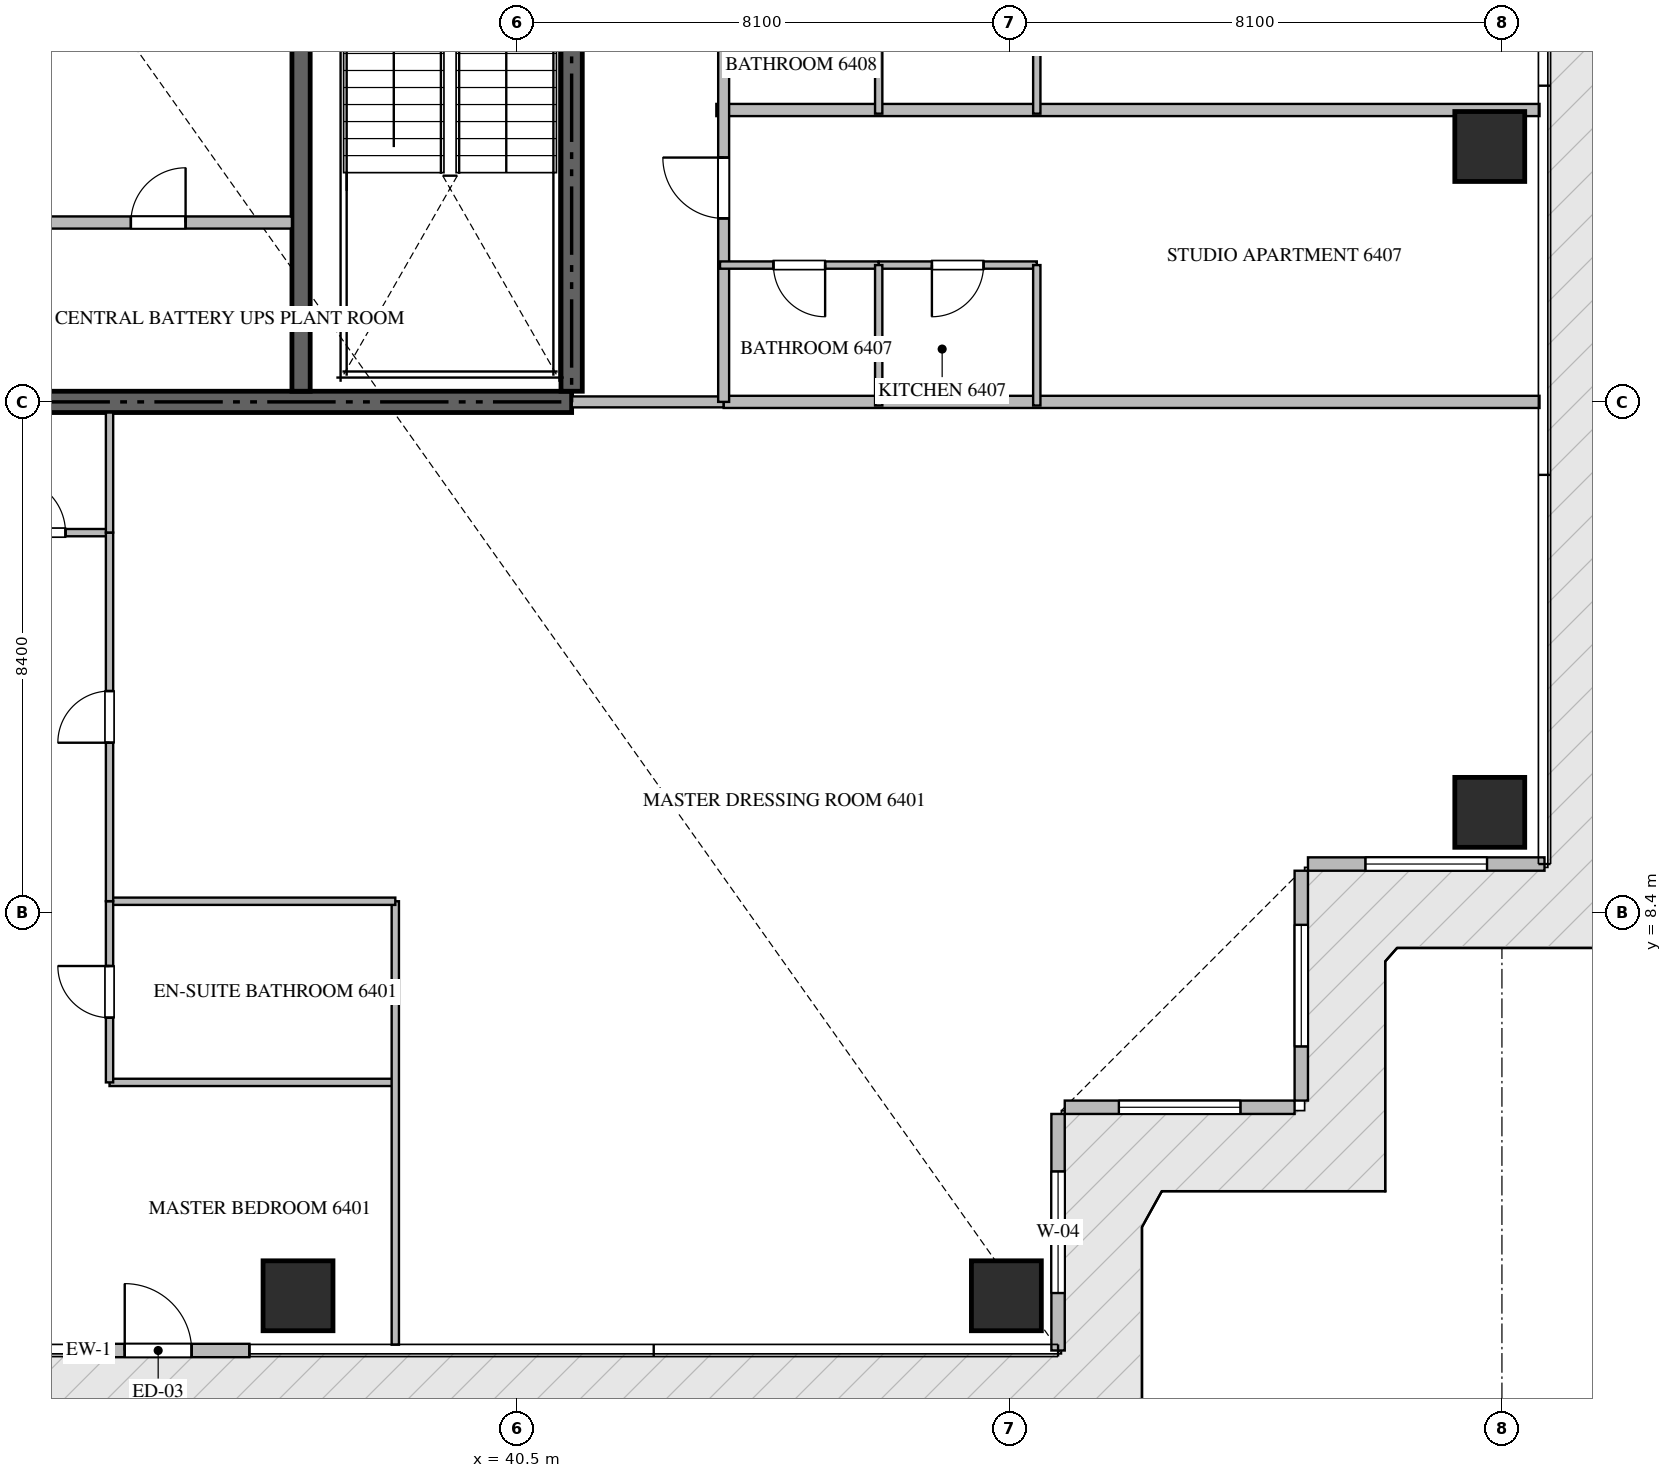
"""IFC4 building model, lengths in metres.
Left out: names, types, materials, properties, quantities, classifications, styles, units other than length and angle.
Written with IfcOpenShell. Run it as: python <this file> out.ifc"""

import sys

from ifc_helpers import new_model, si_unit, direction, frame, frame_2d, origin, origin_2d, place, context, subcontext, project, spatial, rectangle, extrude, source, transform, mapped, element, fill, save


model = new_model("IFC4")
c1 = context("Model", 3, precision=1e-05, world=origin(), true_north=direction((0.0, 1.0)))
c2 = subcontext(c1, "Body", "Model", "MODEL_VIEW")
j1 = project(units=[si_unit("LENGTHUNIT", "METRE"), si_unit("PLANEANGLEUNIT", "RADIAN")], contexts=[c1])
p1 = place(None, origin())
s1 = spatial("IfcSite", under=j1, at=p1, CompositionType="ELEMENT")
p2 = place(p1, origin())
s2 = spatial("IfcBuilding", under=s1, at=p2, CompositionType="ELEMENT")
p3 = place(p2, frame((0.0, 0.0, 256.65)))
s3 = spatial("IfcBuildingStorey", under=s2, at=p3, CompositionType="ELEMENT", Elevation=256.65)
p4 = place(p3, frame((23.4, 16.8, -0.26), z_axis=(0.0, 0.0, 1.0), x_axis=(1.0, 0.0, 0.0)))
e1 = element("IfcWall", 1, at=p4, inside=s3, PredefinedType="SHEAR", context=c2, shape_type="SweptSolid", body=[
    extrude(rectangle(XDim=18.0, YDim=0.35, at=frame_2d((9.0, 0.0))), origin(), (0.0, 0.0, 1.0), 3.848),
])
p5 = place(p3, frame((41.4, 16.975, -0.26), z_axis=(0.0, 0.0, 1.0), x_axis=(0.0, 1.0, 0.0)))
e2 = element("IfcWall", 2, at=p5, inside=s3, PredefinedType="SHEAR", context=c2, shape_type="SweptSolid", body=[
    extrude(rectangle(XDim=8.375, YDim=0.35, at=frame_2d((4.188, 0.0))), origin(), (0.0, 0.0, 1.0), 3.848),
])
p6 = place(p3, frame((36.95, 16.975, -0.26), z_axis=(0.0, 0.0, 1.0), x_axis=(0.0, 1.0, 0.0)))
e3 = element("IfcWall", 3, at=p6, inside=s3, PredefinedType="SHEAR", context=c2, shape_type="SweptSolid", body=[
    extrude(rectangle(XDim=8.375, YDim=0.3, at=frame_2d((4.188, 0.0))), origin(), (0.0, 0.0, 1.0), 3.848),
])
m1 = source(origin(), c2, "Body", "SweptSolid", [
    extrude(rectangle(XDim=1.15, YDim=1.15, at=origin_2d()), origin(), (0.0, 0.0, 1.0), 3.85),
])
for number, where, z_axis, x_axis in (
    (4, (36.9, 2.1, -0.26), (0.0, 0.0, 1.0), (1.0, 0.0, 0.0)),
    (5, (48.55, 2.1, -0.26), (0.0, 0.0, 1.0), (1.0, 0.0, 0.0)),
    (6, (56.5, 10.05, -0.26), (0.0, 0.0, 1.0), (1.0, 0.0, 0.0)),
    (7, (56.5, 21.0, -0.26), (0.0, 0.0, 1.0), (1.0, 0.0, 0.0)),
):
    element("IfcColumn", number, at=place(p3, frame(where, z_axis=z_axis, x_axis=x_axis)), inside=s3, PredefinedType="COLUMN", context=c2, shape_type="MappedRepresentation", body=[
        mapped(m1, transform((0.0, 0.0, 0.0), scale=1.0)),
    ])
p7 = place(p3, frame((33.1, 1.2, 0.0), z_axis=(0.0, 0.0, 1.0), x_axis=(1.0, 0.0, 0.0)))
e8 = element("IfcWall", 8, at=p7, inside=s3, PredefinedType="ELEMENTEDWALL", context=c2, shape_type="SweptSolid", body=[
    extrude(rectangle(XDim=3.0, YDim=0.22, at=frame_2d((1.5, 0.0))), origin(), (0.0, 0.0, 1.0), 3.575),
])
p8 = place(p7, frame((0.95, 0.0, 0.0)))
e9 = element("IfcOpeningElement", 9, at=p8, cuts=e8, PredefinedType="OPENING", context=c2, shape_type="SweptSolid", body=[
    extrude(rectangle(XDim=1.1, YDim=2.2, at=frame_2d((0.55, 1.1))), frame((0.0, 0.12, 0.0), z_axis=(0.0, -1.0, 0.0), x_axis=(1.0, 0.0, 0.0)), (0.0, 0.0, 1.0), 0.24),
])
p9 = place(p3, frame((49.4, 1.2, 0.0), z_axis=(0.0, 0.0, 1.0), x_axis=(0.0, 1.0, 0.0)))
e10 = element("IfcWall", 10, at=p9, inside=s3, PredefinedType="ELEMENTEDWALL", context=c2, shape_type="SweptSolid", body=[
    extrude(rectangle(XDim=3.89, YDim=0.22, at=frame_2d((1.945, 0.0))), origin(), (0.0, 0.0, 1.0), 3.575),
])
p10 = place(p9, frame((0.945, 0.0, 0.65)))
e11 = element("IfcOpeningElement", 11, at=p10, cuts=e10, PredefinedType="OPENING", context=c2, shape_type="SweptSolid", body=[
    extrude(rectangle(XDim=2.0, YDim=2.2, at=frame_2d((1.0, 1.1))), frame((0.0, 0.12, 0.0), z_axis=(0.0, -1.0, 0.0), x_axis=(1.0, 0.0, 0.0)), (0.0, 0.0, 1.0), 0.24),
])
p11 = place(p3, frame((49.51, 5.2, 0.0), z_axis=(0.0, 0.0, 1.0), x_axis=(1.0, 0.0, 0.0)))
e12 = element("IfcWall", 12, at=p11, inside=s3, PredefinedType="ELEMENTEDWALL", context=c2, shape_type="SweptSolid", body=[
    extrude(rectangle(XDim=3.78, YDim=0.22, at=frame_2d((1.89, 0.0))), origin(), (0.0, 0.0, 1.0), 3.575),
])
p12 = place(p11, frame((0.89, 0.0, 0.65)))
e13 = element("IfcOpeningElement", 13, at=p12, cuts=e12, PredefinedType="OPENING", context=c2, shape_type="SweptSolid", body=[
    extrude(rectangle(XDim=2.0, YDim=2.2, at=frame_2d((1.0, 1.1))), frame((0.0, 0.12, 0.0), z_axis=(0.0, -1.0, 0.0), x_axis=(1.0, 0.0, 0.0)), (0.0, 0.0, 1.0), 0.24),
])
p13 = place(p3, frame((53.4, 5.31, 0.0), z_axis=(0.0, 0.0, 1.0), x_axis=(0.0, 1.0, 0.0)))
e14 = element("IfcWall", 14, at=p13, inside=s3, PredefinedType="ELEMENTEDWALL", context=c2, shape_type="SweptSolid", body=[
    extrude(rectangle(XDim=3.78, YDim=0.22, at=frame_2d((1.89, 0.0))), origin(), (0.0, 0.0, 1.0), 3.575),
])
p14 = place(p13, frame((0.89, 0.0, 0.65)))
e15 = element("IfcOpeningElement", 15, at=p14, cuts=e14, PredefinedType="OPENING", context=c2, shape_type="SweptSolid", body=[
    extrude(rectangle(XDim=2.0, YDim=2.2, at=frame_2d((1.0, 1.1))), frame((0.0, 0.12, 0.0), z_axis=(0.0, -1.0, 0.0), x_axis=(1.0, 0.0, 0.0)), (0.0, 0.0, 1.0), 0.24),
])
p15 = place(p3, frame((53.51, 9.2, 0.0), z_axis=(0.0, 0.0, 1.0), x_axis=(1.0, 0.0, 0.0)))
e16 = element("IfcWall", 16, at=p15, inside=s3, PredefinedType="ELEMENTEDWALL", context=c2, shape_type="SweptSolid", body=[
    extrude(rectangle(XDim=3.89, YDim=0.22, at=frame_2d((1.945, 0.0))), origin(), (0.0, 0.0, 1.0), 3.575),
])
p16 = place(p15, frame((0.945, 0.0, 0.65)))
e17 = element("IfcOpeningElement", 17, at=p16, cuts=e16, PredefinedType="OPENING", context=c2, shape_type="SweptSolid", body=[
    extrude(rectangle(XDim=2.0, YDim=2.2, at=frame_2d((1.0, 1.1))), frame((0.0, 0.12, 0.0), z_axis=(0.0, -1.0, 0.0), x_axis=(1.0, 0.0, 0.0)), (0.0, 0.0, 1.0), 0.24),
])
p17 = place(p3, frame((32.402, 19.75, 0.0), z_axis=(0.0, 0.0, 1.0), x_axis=(1.0, 0.0, 0.0)))
e18 = element("IfcWall", 18, at=p17, inside=s3, PredefinedType="STANDARD", context=c2, shape_type="SweptSolid", body=[
    extrude(rectangle(XDim=4.398, YDim=0.2, at=frame_2d((2.199, 0.0))), origin(), (0.0, 0.0, 1.0), 3.59),
])
p18 = place(p17, frame((1.749, 0.0, 0.0)))
e19 = element("IfcOpeningElement", 19, at=p18, cuts=e18, PredefinedType="OPENING", context=c2, shape_type="SweptSolid", body=[
    extrude(rectangle(XDim=0.9, YDim=2.1, at=frame_2d((0.45, 1.05))), frame((0.0, 0.11, 0.0), z_axis=(0.0, -1.0, 0.0), x_axis=(1.0, 0.0, 0.0)), (0.0, 0.0, 1.0), 0.22),
])
p19 = place(p3, frame((43.78, 21.6, 0.0), z_axis=(0.0, 0.0, 1.0), x_axis=(1.0, 0.0, 0.0)))
e20 = element("IfcWall", 20, at=p19, inside=s3, PredefinedType="PARTITIONING", context=c2, shape_type="SweptSolid", body=[
    extrude(rectangle(XDim=13.538, YDim=0.2, at=frame_2d((6.769, 0.0))), origin(), (0.0, 0.0, 1.0), 3.59),
])
p20 = place(p3, frame((43.9, 16.8, 0.0), z_axis=(0.0, 0.0, 1.0), x_axis=(1.0, 0.0, 0.0)))
e21 = element("IfcWall", 21, at=p20, inside=s3, PredefinedType="PARTITIONING", context=c2, shape_type="SweptSolid", body=[
    extrude(rectangle(XDim=13.418, YDim=0.2, at=frame_2d((6.709, 0.0))), origin(), (0.0, 0.0, 1.0), 3.59),
])
p21 = place(p3, frame((41.402, 16.8, 0.0), z_axis=(0.0, 0.0, 1.0), x_axis=(1.0, 0.0, 0.0)))
e22 = element("IfcWall", 22, at=p21, inside=s3, PredefinedType="PARTITIONING", context=c2, shape_type="SweptSolid", body=[
    extrude(rectangle(XDim=2.496, YDim=0.18, at=frame_2d((1.248, 0.0))), origin(), (0.0, 0.0, 1.0), 3.59),
])
p22 = place(p3, frame((43.9, 16.8, 0.0), z_axis=(0.0, 0.0, 1.0), x_axis=(0.0, 1.0, 0.0)))
e23 = element("IfcWall", 23, at=p22, inside=s3, PredefinedType="PARTITIONING", context=c2, shape_type="SweptSolid", body=[
    extrude(rectangle(XDim=16.8, YDim=0.18, at=frame_2d((8.4, 0.0))), origin(), (0.0, 0.0, 1.0), 3.59),
])
p23 = place(p22, frame((3.018, 0.0, 0.0)))
e24 = element("IfcOpeningElement", 24, at=p23, cuts=e23, PredefinedType="OPENING", context=c2, shape_type="SweptSolid", body=[
    extrude(rectangle(XDim=1.0, YDim=2.15, at=frame_2d((0.5, 1.075))), frame((0.0, 0.1, 0.0), z_axis=(0.0, -1.0, 0.0), x_axis=(1.0, 0.0, 0.0)), (0.0, 0.0, 1.0), 0.2),
])
p24 = place(p22, frame((9.18, 0.0, 0.0)))
e25 = element("IfcOpeningElement", 25, at=p24, cuts=e23, PredefinedType="OPENING", context=c2, shape_type="SweptSolid", body=[
    extrude(rectangle(XDim=1.0, YDim=2.15, at=frame_2d((0.5, 1.075))), frame((0.0, 0.1, 0.0), z_axis=(0.0, -1.0, 0.0), x_axis=(1.0, 0.0, 0.0)), (0.0, 0.0, 1.0), 0.2),
])
p25 = place(p22, frame((14.5, 0.0, 0.0)))
e26 = element("IfcOpeningElement", 26, at=p25, cuts=e23, PredefinedType="OPENING", context=c2, shape_type="SweptSolid", body=[
    extrude(rectangle(XDim=1.0, YDim=2.15, at=frame_2d((0.5, 1.075))), frame((0.0, 0.1, 0.0), z_axis=(0.0, -1.0, 0.0), x_axis=(1.0, 0.0, 0.0)), (0.0, 0.0, 1.0), 0.2),
])
p26 = place(p3, frame((31.452, 14.65, 0.0), z_axis=(0.0, 0.0, 1.0), x_axis=(1.0, 0.0, 0.0)))
e27 = element("IfcWall", 27, at=p26, inside=s3, PredefinedType="PARTITIONING", context=c2, shape_type="SweptSolid", body=[
    extrude(rectangle(XDim=2.348, YDim=0.12, at=frame_2d((1.174, 0.0))), origin(), (0.0, 0.0, 1.0), 3.59),
])
p27 = place(p26, frame((0.724, 0.0, 0.0)))
e28 = element("IfcOpeningElement", 28, at=p27, cuts=e27, PredefinedType="OPENING", context=c2, shape_type="SweptSolid", body=[
    extrude(rectangle(XDim=0.9, YDim=2.1, at=frame_2d((0.45, 1.05))), frame((0.0, 0.07, 0.0), z_axis=(0.0, -1.0, 0.0), x_axis=(1.0, 0.0, 0.0)), (0.0, 0.0, 1.0), 0.14),
])
p28 = place(p3, frame((33.8, 5.609, 0.0), z_axis=(0.0, 0.0, 1.0), x_axis=(1.0, 0.0, 0.0)))
e29 = element("IfcWall", 29, at=p28, inside=s3, PredefinedType="PARTITIONING", context=c2, shape_type="SweptSolid", body=[
    extrude(rectangle(XDim=4.7, YDim=0.12, at=frame_2d((2.35, 0.0))), origin(), (0.0, 0.0, 1.0), 3.59),
])
p29 = place(p3, frame((38.5, 1.295, 0.0), z_axis=(0.0, 0.0, 1.0), x_axis=(0.0, 1.0, 0.0)))
e30 = element("IfcWall", 30, at=p29, inside=s3, PredefinedType="PARTITIONING", context=c2, shape_type="SweptSolid", body=[
    extrude(rectangle(XDim=7.293, YDim=0.12, at=frame_2d((3.646, 0.0))), origin(), (0.0, 0.0, 1.0), 3.59),
])
p30 = place(p3, frame((33.8, 8.588, 0.0), z_axis=(0.0, 0.0, 1.0), x_axis=(1.0, 0.0, 0.0)))
e31 = element("IfcWall", 31, at=p30, inside=s3, PredefinedType="PARTITIONING", context=c2, shape_type="SweptSolid", body=[
    extrude(rectangle(XDim=4.7, YDim=0.12, at=frame_2d((2.35, 0.0))), origin(), (0.0, 0.0, 1.0), 3.59),
])
p31 = place(p3, frame((33.8, 5.609, 0.0), z_axis=(0.0, 0.0, 1.0), x_axis=(0.0, 1.0, 0.0)))
e32 = element("IfcWall", 32, at=p31, inside=s3, PredefinedType="PARTITIONING", context=c2, shape_type="SweptSolid", body=[
    extrude(rectangle(XDim=2.979, YDim=0.12, at=frame_2d((1.49, 0.0))), origin(), (0.0, 0.0, 1.0), 3.59),
])
p32 = place(p31, frame((1.064, 0.0, 0.0)))
e33 = element("IfcOpeningElement", 33, at=p32, cuts=e32, PredefinedType="OPENING", context=c2, shape_type="SweptSolid", body=[
    extrude(rectangle(XDim=0.85, YDim=2.1, at=frame_2d((0.425, 1.05))), frame((0.0, 0.07, 0.0), z_axis=(0.0, -1.0, 0.0), x_axis=(1.0, 0.0, 0.0)), (0.0, 0.0, 1.0), 0.14),
])
p33 = place(p3, frame((33.8, 8.59, 0.0), z_axis=(0.0, 0.0, 1.0), x_axis=(0.0, 1.0, 0.0)))
e34 = element("IfcWall", 34, at=p33, inside=s3, PredefinedType="PARTITIONING", context=c2, shape_type="SweptSolid", body=[
    extrude(rectangle(XDim=6.06, YDim=0.12, at=frame_2d((3.03, 0.0))), origin(), (0.0, 0.0, 1.0), 3.59),
])
p34 = place(p33, frame((2.605, 0.0, 0.0)))
e35 = element("IfcOpeningElement", 35, at=p34, cuts=e34, PredefinedType="OPENING", context=c2, shape_type="SweptSolid", body=[
    extrude(rectangle(XDim=0.85, YDim=2.1, at=frame_2d((0.425, 1.05))), frame((0.0, 0.07, 0.0), z_axis=(0.0, -1.0, 0.0), x_axis=(1.0, 0.0, 0.0)), (0.0, 0.0, 1.0), 0.14),
])
p35 = place(p3, frame((33.8, 14.652, 0.0), z_axis=(0.0, 0.0, 1.0), x_axis=(0.0, 1.0, 0.0)))
e36 = element("IfcWall", 36, at=p35, inside=s3, PredefinedType="PARTITIONING", context=c2, shape_type="SweptSolid", body=[
    extrude(rectangle(XDim=1.973, YDim=0.12, at=frame_2d((0.986, 0.0))), origin(), (0.0, 0.0, 1.0), 3.59),
])
p36 = place(p3, frame((49.05, 19.05, 0.0), z_axis=(0.0, 0.0, 1.0), x_axis=(-1.0, 0.0, 0.0)))
e37 = element("IfcWall", 37, at=p36, inside=s3, PredefinedType="PARTITIONING", context=c2, shape_type="SweptSolid", body=[
    extrude(rectangle(XDim=2.6, YDim=0.12, at=frame_2d((1.3, 0.0))), origin(), (0.0, 0.0, 1.0), 3.59),
])
p37 = place(p36, frame((0.875, 0.0, 0.0)))
e38 = element("IfcOpeningElement", 38, at=p37, cuts=e37, PredefinedType="OPENING", context=c2, shape_type="SweptSolid", body=[
    extrude(rectangle(XDim=0.85, YDim=2.1, at=frame_2d((0.425, 1.05))), frame((0.0, 0.07, 0.0), z_axis=(0.0, -1.0, 0.0), x_axis=(1.0, 0.0, 0.0)), (0.0, 0.0, 1.0), 0.14),
])
p38 = place(p3, frame((46.448, 19.05, 0.0), z_axis=(0.0, 0.0, 1.0), x_axis=(-1.0, 0.0, 0.0)))
e39 = element("IfcWall", 39, at=p38, inside=s3, PredefinedType="PARTITIONING", context=c2, shape_type="SweptSolid", body=[
    extrude(rectangle(XDim=2.608, YDim=0.12, at=frame_2d((1.304, 0.0))), origin(), (0.0, 0.0, 1.0), 3.59),
])
p39 = place(p38, frame((0.879, 0.0, 0.0)))
e40 = element("IfcOpeningElement", 40, at=p39, cuts=e39, PredefinedType="OPENING", context=c2, shape_type="SweptSolid", body=[
    extrude(rectangle(XDim=0.85, YDim=2.1, at=frame_2d((0.425, 1.05))), frame((0.0, 0.07, 0.0), z_axis=(0.0, -1.0, 0.0), x_axis=(1.0, 0.0, 0.0)), (0.0, 0.0, 1.0), 0.14),
])
for number, where, z_axis, x_axis in (
    (41, (46.45, 16.74, 0.0), (0.0, 0.0, 1.0), (0.0, 1.0, 0.0)),
    (42, (49.05, 16.74, 0.0), (0.0, 0.0, 1.0), (0.0, 1.0, 0.0)),
):
    element("IfcWall", number, at=place(p3, frame(where, z_axis=z_axis, x_axis=x_axis)), inside=s3, PredefinedType="PARTITIONING", context=c2, shape_type="SweptSolid", body=[
        extrude(rectangle(XDim=2.31, YDim=0.12, at=frame_2d((1.155, 0.0))), origin(), (0.0, 0.0, 1.0), 3.59),
    ])
for number, where, z_axis, x_axis in (
    (43, (46.45, 21.54, 0.0), (0.0, 0.0, 1.0), (0.0, 1.0, 0.0)),
    (44, (49.05, 21.54, 0.0), (0.0, 0.0, 1.0), (0.0, 1.0, 0.0)),
):
    element("IfcWall", number, at=place(p3, frame(where, z_axis=z_axis, x_axis=x_axis)), inside=s3, PredefinedType="PARTITIONING", context=c2, shape_type="SweptSolid", body=[
        extrude(rectangle(XDim=2.81, YDim=0.12, at=frame_2d((1.405, 0.0))), origin(), (0.0, 0.0, 1.0), 3.59),
    ])
m2 = source(origin(), c2, "Body", "SweptSolid", [
    extrude(rectangle(XDim=1.1, YDim=2.2, at=frame_2d((0.55, 1.1))), frame((0.0, 0.025, 0.0), z_axis=(0.0, -1.0, 0.0), x_axis=(1.0, 0.0, 0.0)), (0.0, 0.0, 1.0), 0.05),
])
p40 = place(p8, origin())
e45 = element("IfcDoor", 45, at=p40, inside=s3, OperationType="SINGLE_SWING_LEFT", PredefinedType="DOOR", context=c2, shape_type="MappedRepresentation", body=[
    mapped(m2, transform((0.0, 0.0, 0.0), scale=1.0)),
])
fill(e9, e45)
m3 = source(origin(), c2, "Body", "SweptSolid", [
    extrude(rectangle(XDim=2.0, YDim=2.2, at=frame_2d((1.0, 1.1))), frame((0.0, 0.03, 0.0), z_axis=(0.0, -1.0, 0.0), x_axis=(1.0, 0.0, 0.0)), (0.0, 0.0, 1.0), 0.06),
])
p41 = place(p10, origin())
e46 = element("IfcWindow", 46, at=p41, inside=s3, PartitioningType="SINGLE_PANEL", PredefinedType="WINDOW", context=c2, shape_type="MappedRepresentation", body=[
    mapped(m3, transform((0.0, 0.0, 0.0), scale=1.0)),
])
fill(e11, e46)
p42 = place(p12, origin())
e47 = element("IfcWindow", 47, at=p42, inside=s3, PartitioningType="SINGLE_PANEL", PredefinedType="WINDOW", context=c2, shape_type="MappedRepresentation", body=[
    mapped(m3, transform((0.0, 0.0, 0.0), scale=1.0)),
])
fill(e13, e47)
p43 = place(p14, origin())
e48 = element("IfcWindow", 48, at=p43, inside=s3, PartitioningType="SINGLE_PANEL", PredefinedType="WINDOW", context=c2, shape_type="MappedRepresentation", body=[
    mapped(m3, transform((0.0, 0.0, 0.0), scale=1.0)),
])
fill(e15, e48)
p44 = place(p16, origin())
e49 = element("IfcWindow", 49, at=p44, inside=s3, PartitioningType="SINGLE_PANEL", PredefinedType="WINDOW", context=c2, shape_type="MappedRepresentation", body=[
    mapped(m3, transform((0.0, 0.0, 0.0), scale=1.0)),
])
fill(e17, e49)
m4 = source(origin(), c2, "Body", "SweptSolid", [
    extrude(rectangle(XDim=0.9, YDim=2.1, at=frame_2d((0.45, 1.05))), frame((0.0, 0.025, 0.0), z_axis=(0.0, -1.0, 0.0), x_axis=(1.0, 0.0, 0.0)), (0.0, 0.0, 1.0), 0.05),
])
p45 = place(p18, origin())
e50 = element("IfcDoor", 50, at=p45, inside=s3, OperationType="SINGLE_SWING_RIGHT", PredefinedType="DOOR", context=c2, shape_type="MappedRepresentation", body=[
    mapped(m4, transform((0.0, 0.0, 0.0), scale=1.0)),
])
fill(e19, e50)
m5 = source(origin(), c2, "Body", "SweptSolid", [
    extrude(rectangle(XDim=1.0, YDim=2.15, at=frame_2d((0.5, 1.075))), frame((0.0, 0.025, 0.0), z_axis=(0.0, -1.0, 0.0), x_axis=(1.0, 0.0, 0.0)), (0.0, 0.0, 1.0), 0.05),
])
p46 = place(p23, origin())
e51 = element("IfcDoor", 51, at=p46, inside=s3, OperationType="SINGLE_SWING_RIGHT", PredefinedType="DOOR", context=c2, shape_type="MappedRepresentation", body=[
    mapped(m5, transform((0.0, 0.0, 0.0), scale=1.0)),
])
fill(e24, e51)
p47 = place(p27, origin())
e52 = element("IfcDoor", 52, at=p47, inside=s3, OperationType="SINGLE_SWING_LEFT", PredefinedType="DOOR", context=c2, shape_type="MappedRepresentation", body=[
    mapped(m4, transform((0.0, 0.0, 0.0), scale=1.0)),
])
fill(e28, e52)
m6 = source(origin(), c2, "Body", "SweptSolid", [
    extrude(rectangle(XDim=0.85, YDim=2.1, at=frame_2d((0.425, 1.05))), frame((0.0, 0.025, 0.0), z_axis=(0.0, -1.0, 0.0), x_axis=(1.0, 0.0, 0.0)), (0.0, 0.0, 1.0), 0.05),
])
p48 = place(p32, origin())
e53 = element("IfcDoor", 53, at=p48, inside=s3, OperationType="SINGLE_SWING_RIGHT", PredefinedType="DOOR", context=c2, shape_type="MappedRepresentation", body=[
    mapped(m6, transform((0.0, 0.0, 0.0), scale=1.0)),
])
fill(e33, e53)
p49 = place(p34, origin())
e54 = element("IfcDoor", 54, at=p49, inside=s3, OperationType="SINGLE_SWING_LEFT", PredefinedType="DOOR", context=c2, shape_type="MappedRepresentation", body=[
    mapped(m6, transform((0.0, 0.0, 0.0), scale=1.0)),
])
fill(e35, e54)
p50 = place(p37, origin())
e55 = element("IfcDoor", 55, at=p50, inside=s3, OperationType="SINGLE_SWING_RIGHT", PredefinedType="DOOR", context=c2, shape_type="MappedRepresentation", body=[
    mapped(m6, transform((0.0, 0.0, 0.0), scale=1.0)),
])
fill(e38, e55)
p51 = place(p39, origin())
e56 = element("IfcDoor", 56, at=p51, inside=s3, OperationType="SINGLE_SWING_LEFT", PredefinedType="DOOR", context=c2, shape_type="MappedRepresentation", body=[
    mapped(m6, transform((0.0, 0.0, 0.0), scale=1.0)),
])
fill(e40, e56)
save(model, sys.argv[1])
